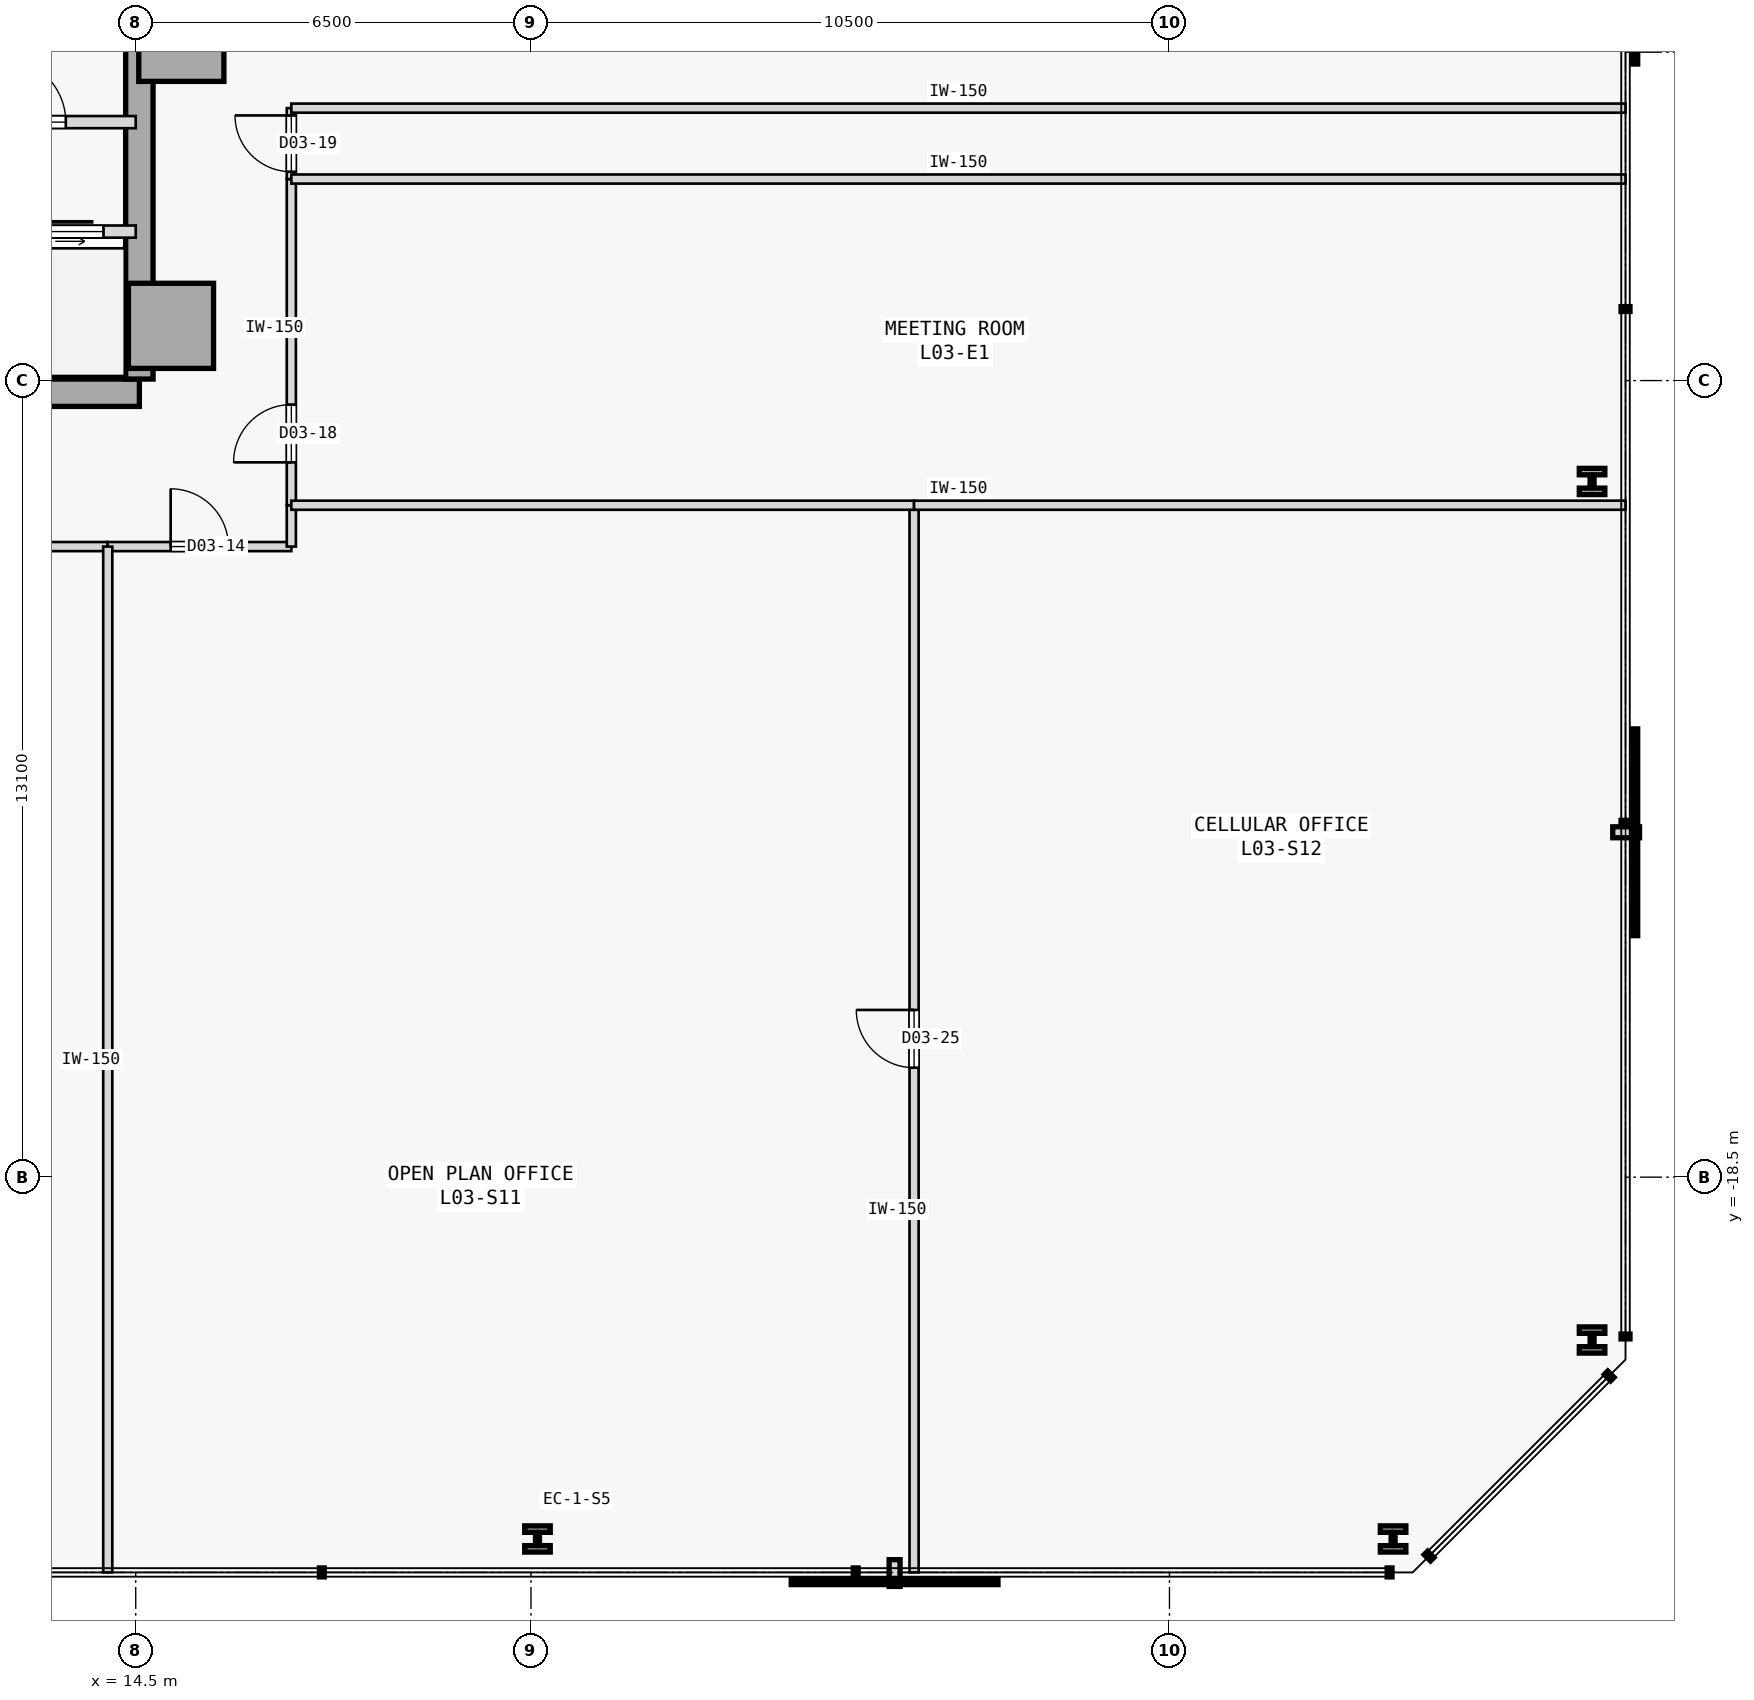
"""IFC4 building model, lengths in metres.
Left out: names, types, materials, properties, quantities, classifications, styles, units other than length and angle.
Written with IfcOpenShell. Run it as: python <this file> out.ifc"""

import sys

from ifc_helpers import new_model, si_unit, direction, frame, frame_2d, origin, origin_2d, place, context, subcontext, project, spatial, rectangle, i_section, extrude, element, fill, save


model = new_model("IFC4")
c1 = context("Model", 3, precision=1e-05, world=origin(), true_north=direction((0.0, 1.0)))
c2 = subcontext(c1, "Body", "Model", "MODEL_VIEW")
j1 = project(units=[si_unit("LENGTHUNIT", "METRE"), si_unit("PLANEANGLEUNIT", "RADIAN")], contexts=[c1])
p1 = place(None, origin())
s1 = spatial("IfcSite", under=j1, at=p1, CompositionType="ELEMENT")
p2 = place(p1, origin())
s2 = spatial("IfcBuilding", under=s1, at=p2, CompositionType="ELEMENT")
p3 = place(p2, frame((0.0, 0.0, 18.0)))
s3 = spatial("IfcBuildingStorey", under=s2, at=p3, CompositionType="ELEMENT", Elevation=18.0)
for number, where, z_axis, x_axis in (
    (1, (15.25, 0.22, 0.0), (0.0, 0.0, 1.0), (1.0, 0.0, 0.0)),
    (2, (15.08, -4.5, 0.0), (0.0, 0.0, 1.0), (1.0, 0.0, 0.0)),
):
    element("IfcColumn", number, at=place(p3, frame(where, z_axis=z_axis, x_axis=x_axis)), inside=s3, PredefinedType="COLUMN", context=c2, shape_type="SweptSolid", body=[
        extrude(rectangle(XDim=1.4, YDim=1.4, at=origin_2d()), origin(), (0.0, 0.0, 1.0), 3.8),
    ])
p4 = place(p3, frame((3.7, -5.6, 0.0), z_axis=(0.0, 0.0, 1.0), x_axis=(1.0, 0.0, 0.0)))
e3 = element("IfcWall", 3, at=p4, inside=s3, PredefinedType="SHEAR", context=c2, shape_type="SweptSolid", body=[
    extrude(rectangle(XDim=10.86, YDim=0.45, at=frame_2d((5.43, 0.0))), origin(), (0.0, 0.0, 1.0), 3.575),
])
p5 = place(p3, frame((14.56, -5.375, 0.0), z_axis=(0.0, 0.0, 1.0), x_axis=(0.0, 1.0, 0.0)))
e4 = element("IfcWall", 4, at=p5, inside=s3, PredefinedType="SHEAR", context=c2, shape_type="SweptSolid", body=[
    extrude(rectangle(XDim=10.75, YDim=0.45, at=frame_2d((5.375, 0.0))), origin(), (0.0, 0.0, 1.0), 3.575),
])
for number, where, z_axis, x_axis in (
    (5, (21.107, -24.45, 0.0), (0.0, 0.0, 1.0), (1.0, 0.0, 0.0)),
    (6, (35.178, -24.45, 0.0), (0.0, 0.0, 1.0), (1.0, 0.0, 0.0)),
    (7, (38.45, -21.178, 0.0), (0.0, 0.0, 1.0), (1.0, 0.0, 0.0)),
    (8, (38.45, -7.059, 0.0), (0.0, 0.0, 1.0), (1.0, 0.0, 0.0)),
):
    element("IfcColumn", number, at=place(p3, frame(where, z_axis=z_axis, x_axis=x_axis)), inside=s3, PredefinedType="COLUMN", context=c2, shape_type="SweptSolid", body=[
        extrude(i_section(OverallWidth=0.42, OverallDepth=0.431, WebThickness=0.065, FlangeThickness=0.106, FilletRadius=0.015, at=origin_2d()), origin(), (0.0, 0.0, 1.0), 3.8),
    ])
p6 = place(p3, frame((11.55, -1.15, 0.0), z_axis=(0.0, 0.0, 1.0), x_axis=(1.0, 0.0, 0.0)))
e9 = element("IfcWall", 9, at=p6, inside=s3, PredefinedType="STANDARD", context=c2, shape_type="SweptSolid", body=[
    extrude(rectangle(XDim=2.95, YDim=0.2, at=frame_2d((1.475, 0.0))), origin(), (0.0, 0.0, 1.0), 3.575),
])
p7 = place(p6, frame((0.75, 0.0, 0.0)))
e10 = element("IfcOpeningElement", 10, at=p7, cuts=e9, PredefinedType="OPENING", context=c2, shape_type="SweptSolid", body=[
    extrude(rectangle(XDim=1.05, YDim=2.18, at=frame_2d((0.525, 1.09))), frame((0.0, 0.11, 0.0), z_axis=(0.0, -1.0, 0.0), x_axis=(1.0, 0.0, 0.0)), (0.0, 0.0, 1.0), 0.22),
])
p8 = place(p3, frame((3.7, -2.95, 0.0), z_axis=(0.0, 0.0, 1.0), x_axis=(1.0, 0.0, 0.0)))
e11 = element("IfcWall", 11, at=p8, inside=s3, PredefinedType="STANDARD", context=c2, shape_type="SweptSolid", body=[
    extrude(rectangle(XDim=10.8, YDim=0.2, at=frame_2d((5.4, 0.0))), origin(), (0.0, 0.0, 1.0), 3.575),
])
p9 = place(p8, frame((7.01, 0.0, 0.0)))
e12 = element("IfcOpeningElement", 12, at=p9, cuts=e11, PredefinedType="OPENING", context=c2, shape_type="SweptSolid", body=[
    extrude(rectangle(XDim=1.1, YDim=2.15, at=frame_2d((0.55, 1.075))), frame((0.0, 0.11, 0.0), z_axis=(0.0, -1.0, 0.0), x_axis=(1.0, 0.0, 0.0)), (0.0, 0.0, 1.0), 0.22),
])
p10 = place(p8, frame((9.17, 0.0, 0.0)))
e13 = element("IfcOpeningElement", 13, at=p10, cuts=e11, PredefinedType="OPENING", context=c2, shape_type="SweptSolid", body=[
    extrude(rectangle(XDim=1.1, YDim=2.15, at=frame_2d((0.55, 1.075))), frame((0.0, 0.11, 0.0), z_axis=(0.0, -1.0, 0.0), x_axis=(1.0, 0.0, 0.0)), (0.0, 0.0, 1.0), 0.22),
])
p11 = place(p3, frame((0.92, -8.13, 0.0), z_axis=(0.0, 0.0, 1.0), x_axis=(1.0, 0.0, 0.0)))
e14 = element("IfcWall", 14, at=p11, inside=s3, PredefinedType="PARTITIONING", context=c2, shape_type="SweptSolid", body=[
    extrude(rectangle(XDim=13.12, YDim=0.15, at=frame_2d((6.56, 0.0))), origin(), (0.0, 0.0, 1.0), 3.575),
])
p12 = place(p3, frame((14.04, -8.13, 0.0), z_axis=(0.0, 0.0, 1.0), x_axis=(1.0, 0.0, 0.0)))
e15 = element("IfcWall", 15, at=p12, inside=s3, PredefinedType="PARTITIONING", context=c2, shape_type="SweptSolid", body=[
    extrude(rectangle(XDim=3.019, YDim=0.15, at=frame_2d((1.51, 0.0))), origin(), (0.0, 0.0, 1.0), 3.575),
])
p13 = place(p12, frame((1.034, 0.0, 0.0)))
e16 = element("IfcOpeningElement", 16, at=p13, cuts=e15, PredefinedType="OPENING", context=c2, shape_type="SweptSolid", body=[
    extrude(rectangle(XDim=0.95, YDim=2.15, at=frame_2d((0.475, 1.075))), frame((0.0, 0.085, 0.0), z_axis=(0.0, -1.0, 0.0), x_axis=(1.0, 0.0, 0.0)), (0.0, 0.0, 1.0), 0.17),
])
p14 = place(p3, frame((17.059, -8.13, 0.0), z_axis=(0.0, 0.0, 1.0), x_axis=(0.0, 1.0, 0.0)))
e17 = element("IfcWall", 17, at=p14, inside=s3, PredefinedType="PARTITIONING", context=c2, shape_type="SweptSolid", body=[
    extrude(rectangle(XDim=0.68, YDim=0.15, at=frame_2d((0.34, 0.0))), origin(), (0.0, 0.0, 1.0), 3.575),
])
p15 = place(p3, frame((17.059, -7.45, 0.0), z_axis=(0.0, 0.0, 1.0), x_axis=(0.0, 1.0, 0.0)))
e18 = element("IfcWall", 18, at=p15, inside=s3, PredefinedType="PARTITIONING", context=c2, shape_type="SweptSolid", body=[
    extrude(rectangle(XDim=5.364, YDim=0.15, at=frame_2d((2.682, 0.0))), origin(), (0.0, 0.0, 1.0), 3.575),
])
p16 = place(p15, frame((0.705, 0.0, 0.0)))
e19 = element("IfcOpeningElement", 19, at=p16, cuts=e18, PredefinedType="OPENING", context=c2, shape_type="SweptSolid", body=[
    extrude(rectangle(XDim=0.95, YDim=2.15, at=frame_2d((0.475, 1.075))), frame((0.0, 0.085, 0.0), z_axis=(0.0, -1.0, 0.0), x_axis=(1.0, 0.0, 0.0)), (0.0, 0.0, 1.0), 0.17),
])
p17 = place(p3, frame((17.059, -2.086, 0.0), z_axis=(0.0, 0.0, 1.0), x_axis=(0.0, 1.0, 0.0)))
e20 = element("IfcWall", 20, at=p17, inside=s3, PredefinedType="PARTITIONING", context=c2, shape_type="SweptSolid", body=[
    extrude(rectangle(XDim=1.166, YDim=0.15, at=frame_2d((0.583, 0.0))), origin(), (0.0, 0.0, 1.0), 3.575),
])
p18 = place(p17, frame((0.12, 0.0, 0.0)))
e21 = element("IfcOpeningElement", 21, at=p18, cuts=e20, PredefinedType="OPENING", context=c2, shape_type="SweptSolid", body=[
    extrude(rectangle(XDim=0.926, YDim=2.15, at=frame_2d((0.463, 1.075))), frame((0.0, 0.085, 0.0), z_axis=(0.0, -1.0, 0.0), x_axis=(1.0, 0.0, 0.0)), (0.0, 0.0, 1.0), 0.17),
])
p19 = place(p3, frame((17.059, -0.92, 0.0), z_axis=(0.0, 0.0, 1.0), x_axis=(1.0, 0.0, 0.0)))
e22 = element("IfcWall", 22, at=p19, inside=s3, PredefinedType="PARTITIONING", context=c2, shape_type="SweptSolid", body=[
    extrude(rectangle(XDim=21.941, YDim=0.15, at=frame_2d((10.97, 0.0))), origin(), (0.0, 0.0, 1.0), 3.575),
])
p20 = place(p3, frame((14.04, -25.0, 0.0), z_axis=(0.0, 0.0, 1.0), x_axis=(0.0, 1.0, 0.0)))
e23 = element("IfcWall", 23, at=p20, inside=s3, PredefinedType="PARTITIONING", context=c2, shape_type="SweptSolid", body=[
    extrude(rectangle(XDim=16.87, YDim=0.15, at=frame_2d((8.435, 0.0))), origin(), (0.0, 0.0, 1.0), 3.575),
])
p21 = place(p3, frame((27.3, -25.0, 0.0), z_axis=(0.0, 0.0, 1.0), x_axis=(0.0, 1.0, 0.0)))
e24 = element("IfcWall", 24, at=p21, inside=s3, PredefinedType="PARTITIONING", context=c2, shape_type="SweptSolid", body=[
    extrude(rectangle(XDim=17.55, YDim=0.15, at=frame_2d((8.775, 0.0))), origin(), (0.0, 0.0, 1.0), 3.575),
])
p22 = place(p21, frame((8.3, 0.0, 0.0)))
e25 = element("IfcOpeningElement", 25, at=p22, cuts=e24, PredefinedType="OPENING", context=c2, shape_type="SweptSolid", body=[
    extrude(rectangle(XDim=0.95, YDim=2.15, at=frame_2d((0.475, 1.075))), frame((0.0, 0.085, 0.0), z_axis=(0.0, -1.0, 0.0), x_axis=(1.0, 0.0, 0.0)), (0.0, 0.0, 1.0), 0.17),
])
p23 = place(p3, frame((17.059, -7.45, 0.0), z_axis=(0.0, 0.0, 1.0), x_axis=(1.0, 0.0, 0.0)))
e26 = element("IfcWall", 26, at=p23, inside=s3, PredefinedType="PARTITIONING", context=c2, shape_type="SweptSolid", body=[
    extrude(rectangle(XDim=10.241, YDim=0.15, at=frame_2d((5.121, 0.0))), origin(), (0.0, 0.0, 1.0), 3.575),
])
p24 = place(p3, frame((27.3, -7.45, 0.0), z_axis=(0.0, 0.0, 1.0), x_axis=(1.0, 0.0, 0.0)))
e27 = element("IfcWall", 27, at=p24, inside=s3, PredefinedType="PARTITIONING", context=c2, shape_type="SweptSolid", body=[
    extrude(rectangle(XDim=11.7, YDim=0.15, at=frame_2d((5.85, 0.0))), origin(), (0.0, 0.0, 1.0), 3.575),
])
p25 = place(p3, frame((17.059, -2.086, 0.0), z_axis=(0.0, 0.0, 1.0), x_axis=(1.0, 0.0, 0.0)))
e28 = element("IfcWall", 28, at=p25, inside=s3, PredefinedType="PARTITIONING", context=c2, shape_type="SweptSolid", body=[
    extrude(rectangle(XDim=21.941, YDim=0.15, at=frame_2d((10.97, 0.0))), origin(), (0.0, 0.0, 1.0), 3.575),
])
p26 = place(p7, origin())
e29 = element("IfcDoor", 29, at=p26, inside=s3, OperationType="SINGLE_SWING_LEFT", PredefinedType="DOOR", context=c2, shape_type="SweptSolid", body=[
    extrude(rectangle(XDim=1.05, YDim=2.18, at=frame_2d((0.525, 1.09))), frame((0.0, 0.025, 0.0), z_axis=(0.0, -1.0, 0.0), x_axis=(1.0, 0.0, 0.0)), (0.0, 0.0, 1.0), 0.05),
])
fill(e10, e29)
p27 = place(p10, origin())
e30 = element("IfcDoor", 30, at=p27, inside=s3, OperationType="SLIDING_TO_LEFT", PredefinedType="DOOR", context=c2, shape_type="SweptSolid", body=[
    extrude(rectangle(XDim=1.1, YDim=2.15, at=frame_2d((0.55, 1.075))), frame((0.0, 0.025, 0.0), z_axis=(0.0, -1.0, 0.0), x_axis=(1.0, 0.0, 0.0)), (0.0, 0.0, 1.0), 0.05),
])
fill(e13, e30)
p28 = place(p13, origin())
e31 = element("IfcDoor", 31, at=p28, inside=s3, OperationType="SINGLE_SWING_LEFT", PredefinedType="DOOR", context=c2, shape_type="SweptSolid", body=[
    extrude(rectangle(XDim=0.95, YDim=2.15, at=frame_2d((0.475, 1.075))), frame((0.0, 0.025, 0.0), z_axis=(0.0, -1.0, 0.0), x_axis=(1.0, 0.0, 0.0)), (0.0, 0.0, 1.0), 0.05),
])
fill(e16, e31)
p29 = place(p16, origin())
e32 = element("IfcDoor", 32, at=p29, inside=s3, OperationType="SINGLE_SWING_LEFT", PredefinedType="DOOR", context=c2, shape_type="SweptSolid", body=[
    extrude(rectangle(XDim=0.95, YDim=2.15, at=frame_2d((0.475, 1.075))), frame((0.0, 0.025, 0.0), z_axis=(0.0, -1.0, 0.0), x_axis=(1.0, 0.0, 0.0)), (0.0, 0.0, 1.0), 0.05),
])
fill(e19, e32)
p30 = place(p18, origin())
e33 = element("IfcDoor", 33, at=p30, inside=s3, OperationType="SINGLE_SWING_RIGHT", PredefinedType="DOOR", context=c2, shape_type="SweptSolid", body=[
    extrude(rectangle(XDim=0.926, YDim=2.15, at=frame_2d((0.463, 1.075))), frame((0.0, 0.025, 0.0), z_axis=(0.0, -1.0, 0.0), x_axis=(1.0, 0.0, 0.0)), (0.0, 0.0, 1.0), 0.05),
])
fill(e21, e33)
p31 = place(p22, origin())
e34 = element("IfcDoor", 34, at=p31, inside=s3, OperationType="SINGLE_SWING_RIGHT", PredefinedType="DOOR", context=c2, shape_type="SweptSolid", body=[
    extrude(rectangle(XDim=0.95, YDim=2.15, at=frame_2d((0.475, 1.075))), frame((0.0, 0.025, 0.0), z_axis=(0.0, -1.0, 0.0), x_axis=(1.0, 0.0, 0.0)), (0.0, 0.0, 1.0), 0.05),
])
fill(e25, e34)
save(model, sys.argv[1])
